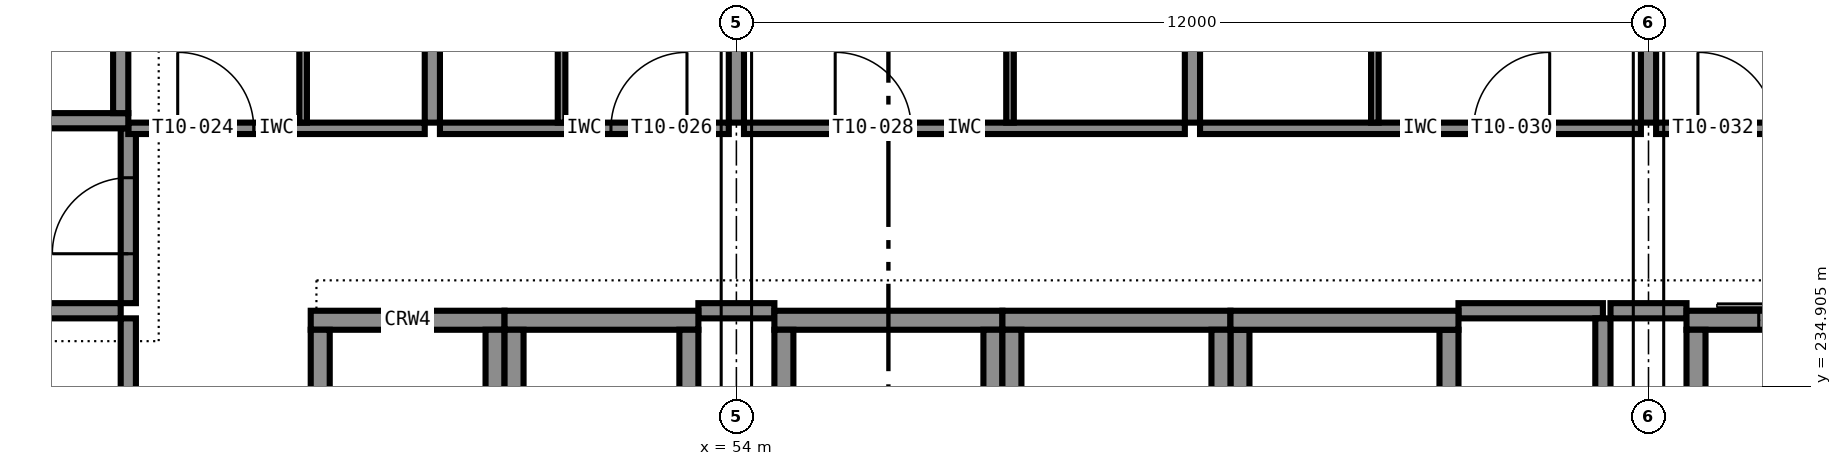
"""IFC4 building model, lengths in metres.
Left out: names, types, materials, properties, quantities, classifications, styles, units other than length and angle.
Written with IfcOpenShell. Run it as: python <this file> out.ifc"""

import sys

from ifc_helpers import new_model, si_unit, direction, frame, frame_2d, origin, place, context, subcontext, project, spatial, rectangle, extrude, element, fill, save


model = new_model("IFC4")
c1 = context("Model", 3, precision=1e-05, world=origin(), true_north=direction((0.0, 1.0)))
c2 = subcontext(c1, "Body", "Model", "MODEL_VIEW")
j1 = project(units=[si_unit("LENGTHUNIT", "METRE"), si_unit("PLANEANGLEUNIT", "RADIAN")], contexts=[c1])
p1 = place(None, origin())
s1 = spatial("IfcSite", under=j1, at=p1, CompositionType="ELEMENT")
p2 = place(p1, origin())
s2 = spatial("IfcBuilding", under=s1, at=p2, CompositionType="ELEMENT")
p3 = place(p2, frame((0.0, 0.0, 42.6)))
s3 = spatial("IfcBuildingStorey", under=s2, at=p3, CompositionType="ELEMENT", Elevation=42.6)
p4 = place(p3, frame((54.5, 235.775, 0.0), z_axis=(0.0, 0.0, 1.0), x_axis=(1.0, 0.0, 0.0)))
e1 = element("IfcWall", 1, at=p4, inside=s3, PredefinedType="SHEAR", context=c2, shape_type="SweptSolid", body=[
    extrude(rectangle(XDim=3.0, YDim=0.25, at=frame_2d((1.5, 0.0))), origin(), (0.0, 0.0, 1.0), 3.6),
])
for number, where, z_axis, x_axis in (
    (2, (54.625, 232.35, 0.0), (0.0, 0.0, 1.0), (0.0, 1.0, 0.0)),
    (3, (57.375, 232.35, 0.0), (0.0, 0.0, 1.0), (0.0, 1.0, 0.0)),
):
    element("IfcWall", number, at=place(p3, frame(where, z_axis=z_axis, x_axis=x_axis)), inside=s3, PredefinedType="SHEAR", context=c2, shape_type="SweptSolid", body=[
        extrude(rectangle(XDim=3.3, YDim=0.25, at=frame_2d((1.65, 0.0))), origin(), (0.0, 0.0, 1.0), 3.6),
    ])
p5 = place(p3, frame((57.5, 235.775, 0.0), z_axis=(0.0, 0.0, 1.0), x_axis=(1.0, 0.0, 0.0)))
e4 = element("IfcWall", 4, at=p5, inside=s3, PredefinedType="SHEAR", context=c2, shape_type="SweptSolid", body=[
    extrude(rectangle(XDim=3.0, YDim=0.25, at=frame_2d((1.5, 0.0))), origin(), (0.0, 0.0, 1.0), 3.6),
])
for number, where, z_axis, x_axis in (
    (5, (57.625, 232.35, 0.0), (0.0, 0.0, 1.0), (0.0, 1.0, 0.0)),
    (6, (60.375, 232.35, 0.0), (0.0, 0.0, 1.0), (0.0, 1.0, 0.0)),
):
    element("IfcWall", number, at=place(p3, frame(where, z_axis=z_axis, x_axis=x_axis)), inside=s3, PredefinedType="SHEAR", context=c2, shape_type="SweptSolid", body=[
        extrude(rectangle(XDim=3.3, YDim=0.25, at=frame_2d((1.65, 0.0))), origin(), (0.0, 0.0, 1.0), 3.6),
    ])
p6 = place(p3, frame((60.5, 235.775, 0.0), z_axis=(0.0, 0.0, 1.0), x_axis=(1.0, 0.0, 0.0)))
e7 = element("IfcWall", 7, at=p6, inside=s3, PredefinedType="SHEAR", context=c2, shape_type="SweptSolid", body=[
    extrude(rectangle(XDim=3.0, YDim=0.25, at=frame_2d((1.5, 0.0))), origin(), (0.0, 0.0, 1.0), 3.6),
])
for number, where, z_axis, x_axis in (
    (8, (60.625, 232.35, 0.0), (0.0, 0.0, 1.0), (0.0, 1.0, 0.0)),
    (9, (63.375, 232.35, 0.0), (0.0, 0.0, 1.0), (0.0, 1.0, 0.0)),
):
    element("IfcWall", number, at=place(p3, frame(where, z_axis=z_axis, x_axis=x_axis)), inside=s3, PredefinedType="SHEAR", context=c2, shape_type="SweptSolid", body=[
        extrude(rectangle(XDim=3.3, YDim=0.25, at=frame_2d((1.65, 0.0))), origin(), (0.0, 0.0, 1.0), 3.6),
    ])
p7 = place(p3, frame((66.5, 235.775, 0.0), z_axis=(0.0, 0.0, 1.0), x_axis=(1.0, 0.0, 0.0)))
e10 = element("IfcWall", 10, at=p7, inside=s3, PredefinedType="SHEAR", context=c2, shape_type="SweptSolid", body=[
    extrude(rectangle(XDim=3.0, YDim=0.25, at=frame_2d((1.5, 0.0))), origin(), (0.0, 0.0, 1.0), 3.6),
])
p8 = place(p7, frame((0.95, 0.0, 0.0)))
e11 = element("IfcOpeningElement", 11, at=p8, cuts=e10, PredefinedType="OPENING", context=c2, shape_type="SweptSolid", body=[
    extrude(rectangle(XDim=1.1, YDim=2.1, at=frame_2d((0.55, 1.05))), frame((0.0, 0.135, 0.0), z_axis=(0.0, -1.0, 0.0), x_axis=(1.0, 0.0, 0.0)), (0.0, 0.0, 1.0), 0.27),
])
p9 = place(p3, frame((66.625, 232.35, 0.0), z_axis=(0.0, 0.0, 1.0), x_axis=(0.0, 1.0, 0.0)))
e12 = element("IfcWall", 12, at=p9, inside=s3, PredefinedType="SHEAR", context=c2, shape_type="SweptSolid", body=[
    extrude(rectangle(XDim=3.3, YDim=0.25, at=frame_2d((1.65, 0.0))), origin(), (0.0, 0.0, 1.0), 3.6),
])
p10 = place(p3, frame((48.4, 235.775, 0.0), z_axis=(0.0, 0.0, 1.0), x_axis=(1.0, 0.0, 0.0)))
e13 = element("IfcWall", 13, at=p10, inside=s3, PredefinedType="SHEAR", context=c2, shape_type="SweptSolid", body=[
    extrude(rectangle(XDim=2.55, YDim=0.25, at=frame_2d((1.275, 0.0))), origin(), (0.0, 0.0, 1.0), 3.6),
])
for number, where, z_axis, x_axis in (
    (14, (48.525, 232.35, 0.0), (0.0, 0.0, 1.0), (0.0, 1.0, 0.0)),
    (15, (50.825, 232.35, 0.0), (0.0, 0.0, 1.0), (0.0, 1.0, 0.0)),
):
    element("IfcWall", number, at=place(p3, frame(where, z_axis=z_axis, x_axis=x_axis)), inside=s3, PredefinedType="SHEAR", context=c2, shape_type="SweptSolid", body=[
        extrude(rectangle(XDim=3.3, YDim=0.25, at=frame_2d((1.65, 0.0))), origin(), (0.0, 0.0, 1.0), 3.6),
    ])
p11 = place(p3, frame((50.95, 235.775, 0.0), z_axis=(0.0, 0.0, 1.0), x_axis=(1.0, 0.0, 0.0)))
e16 = element("IfcWall", 16, at=p11, inside=s3, PredefinedType="SHEAR", context=c2, shape_type="SweptSolid", body=[
    extrude(rectangle(XDim=2.55, YDim=0.25, at=frame_2d((1.275, 0.0))), origin(), (0.0, 0.0, 1.0), 3.6),
])
for number, where, z_axis, x_axis in (
    (17, (51.075, 232.35, 0.0), (0.0, 0.0, 1.0), (0.0, 1.0, 0.0)),
    (18, (53.375, 232.35, 0.0), (0.0, 0.0, 1.0), (0.0, 1.0, 0.0)),
):
    element("IfcWall", number, at=place(p3, frame(where, z_axis=z_axis, x_axis=x_axis)), inside=s3, PredefinedType="SHEAR", context=c2, shape_type="SweptSolid", body=[
        extrude(rectangle(XDim=3.3, YDim=0.25, at=frame_2d((1.65, 0.0))), origin(), (0.0, 0.0, 1.0), 3.6),
    ])
p12 = place(p3, frame((42.5, 238.4, 0.0), z_axis=(0.0, 0.0, 1.0), x_axis=(1.0, 0.0, 0.0)))
e19 = element("IfcWall", 19, at=p12, inside=s3, PredefinedType="SHEAR", context=c2, shape_type="SweptSolid", body=[
    extrude(rectangle(XDim=3.5, YDim=0.2, at=frame_2d((1.75, 0.0))), origin(), (0.0, 0.0, 1.0), 3.6),
])
p13 = place(p12, frame((1.15, 0.0, 0.0)))
e20 = element("IfcOpeningElement", 20, at=p13, cuts=e19, PredefinedType="OPENING", context=c2, shape_type="SweptSolid", body=[
    extrude(rectangle(XDim=1.2, YDim=2.1, at=frame_2d((0.6, 1.05))), frame((0.0, 0.11, 0.0), z_axis=(0.0, -1.0, 0.0), x_axis=(1.0, 0.0, 0.0)), (0.0, 0.0, 1.0), 0.22),
])
p14 = place(p3, frame((45.9, 238.5, 0.0), z_axis=(0.0, 0.0, 1.0), x_axis=(0.0, 1.0, 0.0)))
e21 = element("IfcWall", 21, at=p14, inside=s3, PredefinedType="SHEAR", context=c2, shape_type="SweptSolid", body=[
    extrude(rectangle(XDim=7.0, YDim=0.2, at=frame_2d((3.5, 0.0))), origin(), (0.0, 0.0, 1.0), 3.6),
])
p15 = place(p3, frame((42.3, 235.9, 0.0), z_axis=(0.0, 0.0, 1.0), x_axis=(1.0, 0.0, 0.0)))
e22 = element("IfcWall", 22, at=p15, inside=s3, PredefinedType="PARTITIONING", context=c2, shape_type="SweptSolid", body=[
    extrude(rectangle(XDim=3.6, YDim=0.2, at=frame_2d((1.8, 0.0))), origin(), (0.0, 0.0, 1.0), 3.4),
])
p16 = place(p3, frame((53.5, 235.9, 0.0), z_axis=(0.0, 0.0, 1.0), x_axis=(1.0, 0.0, 0.0)))
e23 = element("IfcWall", 23, at=p16, inside=s3, PredefinedType="PARTITIONING", context=c2, shape_type="SweptSolid", body=[
    extrude(rectangle(XDim=1.0, YDim=0.2, at=frame_2d((0.5, 0.0))), origin(), (0.0, 0.0, 1.0), 3.4),
])
p17 = place(p3, frame((63.5, 235.9, 0.0), z_axis=(0.0, 0.0, 1.0), x_axis=(1.0, 0.0, 0.0)))
e24 = element("IfcWall", 24, at=p17, inside=s3, PredefinedType="PARTITIONING", context=c2, shape_type="SweptSolid", body=[
    extrude(rectangle(XDim=1.9, YDim=0.2, at=frame_2d((0.95, 0.0))), origin(), (0.0, 0.0, 1.0), 3.4),
])
p18 = place(p3, frame((65.5, 235.9, 0.0), z_axis=(0.0, 0.0, 1.0), x_axis=(1.0, 0.0, 0.0)))
e25 = element("IfcWall", 25, at=p18, inside=s3, PredefinedType="PARTITIONING", context=c2, shape_type="SweptSolid", body=[
    extrude(rectangle(XDim=1.0, YDim=0.2, at=frame_2d((0.5, 0.0))), origin(), (0.0, 0.0, 1.0), 3.4),
])
p19 = place(p3, frame((46.0, 232.2, 0.0), z_axis=(0.0, 0.0, 1.0), x_axis=(0.0, 1.0, 0.0)))
e26 = element("IfcWall", 26, at=p19, inside=s3, PredefinedType="PARTITIONING", context=c2, shape_type="SweptSolid", body=[
    extrude(rectangle(XDim=3.6, YDim=0.2, at=frame_2d((1.8, 0.0))), origin(), (0.0, 0.0, 1.0), 3.4),
])
p20 = place(p19, frame((1.35, 0.0, 0.0)))
e27 = element("IfcOpeningElement", 27, at=p20, cuts=e26, PredefinedType="OPENING", context=c2, shape_type="SweptSolid", body=[
    extrude(rectangle(XDim=0.9, YDim=2.1, at=frame_2d((0.45, 1.05))), frame((0.0, 0.11, 0.0), z_axis=(0.0, -1.0, 0.0), x_axis=(1.0, 0.0, 0.0)), (0.0, 0.0, 1.0), 0.22),
])
p21 = place(p3, frame((46.0, 236.0, 0.0), z_axis=(0.0, 0.0, 1.0), x_axis=(0.0, 1.0, 0.0)))
e28 = element("IfcWall", 28, at=p21, inside=s3, PredefinedType="PARTITIONING", context=c2, shape_type="SweptSolid", body=[
    extrude(rectangle(XDim=2.3, YDim=0.2, at=frame_2d((1.15, 0.0))), origin(), (0.0, 0.0, 1.0), 3.4),
])
p22 = place(p21, frame((0.65, 0.0, 0.0)))
e29 = element("IfcOpeningElement", 29, at=p22, cuts=e28, PredefinedType="OPENING", context=c2, shape_type="SweptSolid", body=[
    extrude(rectangle(XDim=1.0, YDim=2.1, at=frame_2d((0.5, 1.05))), frame((0.0, 0.11, 0.0), z_axis=(0.0, -1.0, 0.0), x_axis=(1.0, 0.0, 0.0)), (0.0, 0.0, 1.0), 0.22),
])
p23 = place(p3, frame((65.4, 232.2, 0.0), z_axis=(0.0, 0.0, 1.0), x_axis=(0.0, 1.0, 0.0)))
e30 = element("IfcWall", 30, at=p23, inside=s3, PredefinedType="PARTITIONING", context=c2, shape_type="SweptSolid", body=[
    extrude(rectangle(XDim=3.6, YDim=0.2, at=frame_2d((1.8, 0.0))), origin(), (0.0, 0.0, 1.0), 3.4),
])
p24 = place(p3, frame((46.0, 238.3, 0.0), z_axis=(0.0, 0.0, 1.0), x_axis=(1.0, 0.0, 0.0)))
e31 = element("IfcWall", 31, at=p24, inside=s3, PredefinedType="PARTITIONING", context=c2, shape_type="SweptSolid", body=[
    extrude(rectangle(XDim=3.9, YDim=0.15, at=frame_2d((1.95, 0.0))), origin(), (0.0, 0.0, 1.0), 3.4),
])
p25 = place(p24, frame((0.65, 0.0, 0.0)))
e32 = element("IfcOpeningElement", 32, at=p25, cuts=e31, PredefinedType="OPENING", context=c2, shape_type="SweptSolid", body=[
    extrude(rectangle(XDim=1.0, YDim=2.1, at=frame_2d((0.5, 1.05))), frame((0.0, 0.085, 0.0), z_axis=(0.0, -1.0, 0.0), x_axis=(1.0, 0.0, 0.0)), (0.0, 0.0, 1.0), 0.17),
])
p26 = place(p3, frame((48.3, 238.375, 0.0), z_axis=(0.0, 0.0, 1.0), x_axis=(0.0, 1.0, 0.0)))
e33 = element("IfcWall", 33, at=p26, inside=s3, PredefinedType="PARTITIONING", context=c2, shape_type="SweptSolid", body=[
    extrude(rectangle(XDim=2.875, YDim=0.1, at=frame_2d((1.438, 0.0))), origin(), (0.0, 0.0, 1.0), 3.4),
])
p27 = place(p26, frame((1.038, 0.0, 0.0)))
e34 = element("IfcOpeningElement", 34, at=p27, cuts=e33, PredefinedType="OPENING", context=c2, shape_type="SweptSolid", body=[
    extrude(rectangle(XDim=0.8, YDim=2.1, at=frame_2d((0.4, 1.05))), frame((0.0, 0.06, 0.0), z_axis=(0.0, -1.0, 0.0), x_axis=(1.0, 0.0, 0.0)), (0.0, 0.0, 1.0), 0.12),
])
p28 = place(p3, frame((50.1, 238.3, 0.0), z_axis=(0.0, 0.0, 1.0), x_axis=(1.0, 0.0, 0.0)))
e35 = element("IfcWall", 35, at=p28, inside=s3, PredefinedType="PARTITIONING", context=c2, shape_type="SweptSolid", body=[
    extrude(rectangle(XDim=3.8, YDim=0.15, at=frame_2d((1.9, 0.0))), origin(), (0.0, 0.0, 1.0), 3.4),
])
p29 = place(p28, frame((2.25, 0.0, 0.0)))
e36 = element("IfcOpeningElement", 36, at=p29, cuts=e35, PredefinedType="OPENING", context=c2, shape_type="SweptSolid", body=[
    extrude(rectangle(XDim=1.0, YDim=2.1, at=frame_2d((0.5, 1.05))), frame((0.0, 0.085, 0.0), z_axis=(0.0, -1.0, 0.0), x_axis=(1.0, 0.0, 0.0)), (0.0, 0.0, 1.0), 0.17),
])
p30 = place(p3, frame((51.7, 241.25, 0.0), z_axis=(0.0, 0.0, 1.0), x_axis=(0.0, -1.0, 0.0)))
e37 = element("IfcWall", 37, at=p30, inside=s3, PredefinedType="PARTITIONING", context=c2, shape_type="SweptSolid", body=[
    extrude(rectangle(XDim=2.875, YDim=0.1, at=frame_2d((1.438, 0.0))), origin(), (0.0, 0.0, 1.0), 3.4),
])
p31 = place(p30, frame((1.038, 0.0, 0.0)))
e38 = element("IfcOpeningElement", 38, at=p31, cuts=e37, PredefinedType="OPENING", context=c2, shape_type="SweptSolid", body=[
    extrude(rectangle(XDim=0.8, YDim=2.1, at=frame_2d((0.4, 1.05))), frame((0.0, 0.06, 0.0), z_axis=(0.0, -1.0, 0.0), x_axis=(1.0, 0.0, 0.0)), (0.0, 0.0, 1.0), 0.12),
])
p32 = place(p3, frame((54.1, 238.3, 0.0), z_axis=(0.0, 0.0, 1.0), x_axis=(1.0, 0.0, 0.0)))
e39 = element("IfcWall", 39, at=p32, inside=s3, PredefinedType="PARTITIONING", context=c2, shape_type="SweptSolid", body=[
    extrude(rectangle(XDim=5.8, YDim=0.15, at=frame_2d((2.9, 0.0))), origin(), (0.0, 0.0, 1.0), 3.4),
])
p33 = place(p32, frame((1.2, 0.0, 0.0)))
e40 = element("IfcOpeningElement", 40, at=p33, cuts=e39, PredefinedType="OPENING", context=c2, shape_type="SweptSolid", body=[
    extrude(rectangle(XDim=1.0, YDim=2.1, at=frame_2d((0.5, 1.05))), frame((0.0, 0.085, 0.0), z_axis=(0.0, -1.0, 0.0), x_axis=(1.0, 0.0, 0.0)), (0.0, 0.0, 1.0), 0.17),
])
p34 = place(p3, frame((57.6, 238.375, 0.0), z_axis=(0.0, 0.0, 1.0), x_axis=(0.0, 1.0, 0.0)))
e41 = element("IfcWall", 41, at=p34, inside=s3, PredefinedType="PARTITIONING", context=c2, shape_type="SweptSolid", body=[
    extrude(rectangle(XDim=2.875, YDim=0.1, at=frame_2d((1.438, 0.0))), origin(), (0.0, 0.0, 1.0), 3.4),
])
p35 = place(p34, frame((1.038, 0.0, 0.0)))
e42 = element("IfcOpeningElement", 42, at=p35, cuts=e41, PredefinedType="OPENING", context=c2, shape_type="SweptSolid", body=[
    extrude(rectangle(XDim=0.8, YDim=2.1, at=frame_2d((0.4, 1.05))), frame((0.0, 0.06, 0.0), z_axis=(0.0, -1.0, 0.0), x_axis=(1.0, 0.0, 0.0)), (0.0, 0.0, 1.0), 0.12),
])
p36 = place(p3, frame((60.1, 238.3, 0.0), z_axis=(0.0, 0.0, 1.0), x_axis=(1.0, 0.0, 0.0)))
e43 = element("IfcWall", 43, at=p36, inside=s3, PredefinedType="PARTITIONING", context=c2, shape_type="SweptSolid", body=[
    extrude(rectangle(XDim=5.8, YDim=0.15, at=frame_2d((2.9, 0.0))), origin(), (0.0, 0.0, 1.0), 3.4),
])
p37 = place(p36, frame((3.6, 0.0, 0.0)))
e44 = element("IfcOpeningElement", 44, at=p37, cuts=e43, PredefinedType="OPENING", context=c2, shape_type="SweptSolid", body=[
    extrude(rectangle(XDim=1.0, YDim=2.1, at=frame_2d((0.5, 1.05))), frame((0.0, 0.085, 0.0), z_axis=(0.0, -1.0, 0.0), x_axis=(1.0, 0.0, 0.0)), (0.0, 0.0, 1.0), 0.17),
])
p38 = place(p3, frame((62.4, 241.25, 0.0), z_axis=(0.0, 0.0, 1.0), x_axis=(0.0, -1.0, 0.0)))
e45 = element("IfcWall", 45, at=p38, inside=s3, PredefinedType="PARTITIONING", context=c2, shape_type="SweptSolid", body=[
    extrude(rectangle(XDim=2.875, YDim=0.1, at=frame_2d((1.438, 0.0))), origin(), (0.0, 0.0, 1.0), 3.4),
])
p39 = place(p38, frame((1.038, 0.0, 0.0)))
e46 = element("IfcOpeningElement", 46, at=p39, cuts=e45, PredefinedType="OPENING", context=c2, shape_type="SweptSolid", body=[
    extrude(rectangle(XDim=0.8, YDim=2.1, at=frame_2d((0.4, 1.05))), frame((0.0, 0.06, 0.0), z_axis=(0.0, -1.0, 0.0), x_axis=(1.0, 0.0, 0.0)), (0.0, 0.0, 1.0), 0.12),
])
p40 = place(p3, frame((66.1, 238.3, 0.0), z_axis=(0.0, 0.0, 1.0), x_axis=(1.0, 0.0, 0.0)))
e47 = element("IfcWall", 47, at=p40, inside=s3, PredefinedType="PARTITIONING", context=c2, shape_type="SweptSolid", body=[
    extrude(rectangle(XDim=3.8, YDim=0.15, at=frame_2d((1.9, 0.0))), origin(), (0.0, 0.0, 1.0), 3.4),
])
p41 = place(p40, frame((0.55, 0.0, 0.0)))
e48 = element("IfcOpeningElement", 48, at=p41, cuts=e47, PredefinedType="OPENING", context=c2, shape_type="SweptSolid", body=[
    extrude(rectangle(XDim=1.0, YDim=2.1, at=frame_2d((0.5, 1.05))), frame((0.0, 0.085, 0.0), z_axis=(0.0, -1.0, 0.0), x_axis=(1.0, 0.0, 0.0)), (0.0, 0.0, 1.0), 0.17),
])
p42 = place(p3, frame((50.0, 245.7, 0.0), z_axis=(0.0, 0.0, 1.0), x_axis=(0.0, -1.0, 0.0)))
e49 = element("IfcWall", 49, at=p42, inside=s3, PredefinedType="PARTITIONING", context=c2, shape_type="SweptSolid", body=[
    extrude(rectangle(XDim=7.325, YDim=0.2, at=frame_2d((3.663, 0.0))), origin(), (0.0, 0.0, 1.0), 3.4),
])
p43 = place(p3, frame((54.0, 245.6, 0.0), z_axis=(0.0, 0.0, 1.0), x_axis=(0.0, -1.0, 0.0)))
e50 = element("IfcWall", 50, at=p43, inside=s3, PredefinedType="PARTITIONING", context=c2, shape_type="SweptSolid", body=[
    extrude(rectangle(XDim=7.225, YDim=0.2, at=frame_2d((3.613, 0.0))), origin(), (0.0, 0.0, 1.0), 2.6),
])
p44 = place(p3, frame((60.0, 245.7, 0.0), z_axis=(0.0, 0.0, 1.0), x_axis=(0.0, -1.0, 0.0)))
e51 = element("IfcWall", 51, at=p44, inside=s3, PredefinedType="PARTITIONING", context=c2, shape_type="SweptSolid", body=[
    extrude(rectangle(XDim=7.325, YDim=0.2, at=frame_2d((3.663, 0.0))), origin(), (0.0, 0.0, 1.0), 3.4),
])
p45 = place(p3, frame((66.0, 245.6, 0.0), z_axis=(0.0, 0.0, 1.0), x_axis=(0.0, -1.0, 0.0)))
e52 = element("IfcWall", 52, at=p45, inside=s3, PredefinedType="PARTITIONING", context=c2, shape_type="SweptSolid", body=[
    extrude(rectangle(XDim=7.225, YDim=0.2, at=frame_2d((3.613, 0.0))), origin(), (0.0, 0.0, 1.0), 2.6),
])
p46 = place(p22, origin())
e53 = element("IfcDoor", 53, at=p46, inside=s3, OperationType="SINGLE_SWING_LEFT", PredefinedType="DOOR", context=c2, shape_type="SweptSolid", body=[
    extrude(rectangle(XDim=1.0, YDim=2.1, at=frame_2d((0.5, 1.05))), frame((0.0, 0.025, 0.0), z_axis=(0.0, -1.0, 0.0), x_axis=(1.0, 0.0, 0.0)), (0.0, 0.0, 1.0), 0.05),
])
fill(e29, e53)
p47 = place(p25, origin())
e54 = element("IfcDoor", 54, at=p47, inside=s3, OperationType="SINGLE_SWING_LEFT", PredefinedType="DOOR", context=c2, shape_type="SweptSolid", body=[
    extrude(rectangle(XDim=1.0, YDim=2.1, at=frame_2d((0.5, 1.05))), frame((0.0, 0.025, 0.0), z_axis=(0.0, -1.0, 0.0), x_axis=(1.0, 0.0, 0.0)), (0.0, 0.0, 1.0), 0.05),
])
fill(e32, e54)
p48 = place(p29, origin())
e55 = element("IfcDoor", 55, at=p48, inside=s3, OperationType="SINGLE_SWING_RIGHT", PredefinedType="DOOR", context=c2, shape_type="SweptSolid", body=[
    extrude(rectangle(XDim=1.0, YDim=2.1, at=frame_2d((0.5, 1.05))), frame((0.0, 0.025, 0.0), z_axis=(0.0, -1.0, 0.0), x_axis=(1.0, 0.0, 0.0)), (0.0, 0.0, 1.0), 0.05),
])
fill(e36, e55)
p49 = place(p33, origin())
e56 = element("IfcDoor", 56, at=p49, inside=s3, OperationType="SINGLE_SWING_LEFT", PredefinedType="DOOR", context=c2, shape_type="SweptSolid", body=[
    extrude(rectangle(XDim=1.0, YDim=2.1, at=frame_2d((0.5, 1.05))), frame((0.0, 0.025, 0.0), z_axis=(0.0, -1.0, 0.0), x_axis=(1.0, 0.0, 0.0)), (0.0, 0.0, 1.0), 0.05),
])
fill(e40, e56)
p50 = place(p37, origin())
e57 = element("IfcDoor", 57, at=p50, inside=s3, OperationType="SINGLE_SWING_RIGHT", PredefinedType="DOOR", context=c2, shape_type="SweptSolid", body=[
    extrude(rectangle(XDim=1.0, YDim=2.1, at=frame_2d((0.5, 1.05))), frame((0.0, 0.025, 0.0), z_axis=(0.0, -1.0, 0.0), x_axis=(1.0, 0.0, 0.0)), (0.0, 0.0, 1.0), 0.05),
])
fill(e44, e57)
p51 = place(p41, origin())
e58 = element("IfcDoor", 58, at=p51, inside=s3, OperationType="SINGLE_SWING_LEFT", PredefinedType="DOOR", context=c2, shape_type="SweptSolid", body=[
    extrude(rectangle(XDim=1.0, YDim=2.1, at=frame_2d((0.5, 1.05))), frame((0.0, 0.025, 0.0), z_axis=(0.0, -1.0, 0.0), x_axis=(1.0, 0.0, 0.0)), (0.0, 0.0, 1.0), 0.05),
])
fill(e48, e58)
p52 = place(p8, origin())
e59 = element("IfcDoor", 59, at=p52, inside=s3, OperationType="SLIDING_TO_LEFT", PredefinedType="DOOR", context=c2, shape_type="SweptSolid", body=[
    extrude(rectangle(XDim=1.1, YDim=2.1, at=frame_2d((0.55, 1.05))), frame((0.0, 0.025, 0.0), z_axis=(0.0, -1.0, 0.0), x_axis=(1.0, 0.0, 0.0)), (0.0, 0.0, 1.0), 0.05),
])
fill(e11, e59)
save(model, sys.argv[1])
